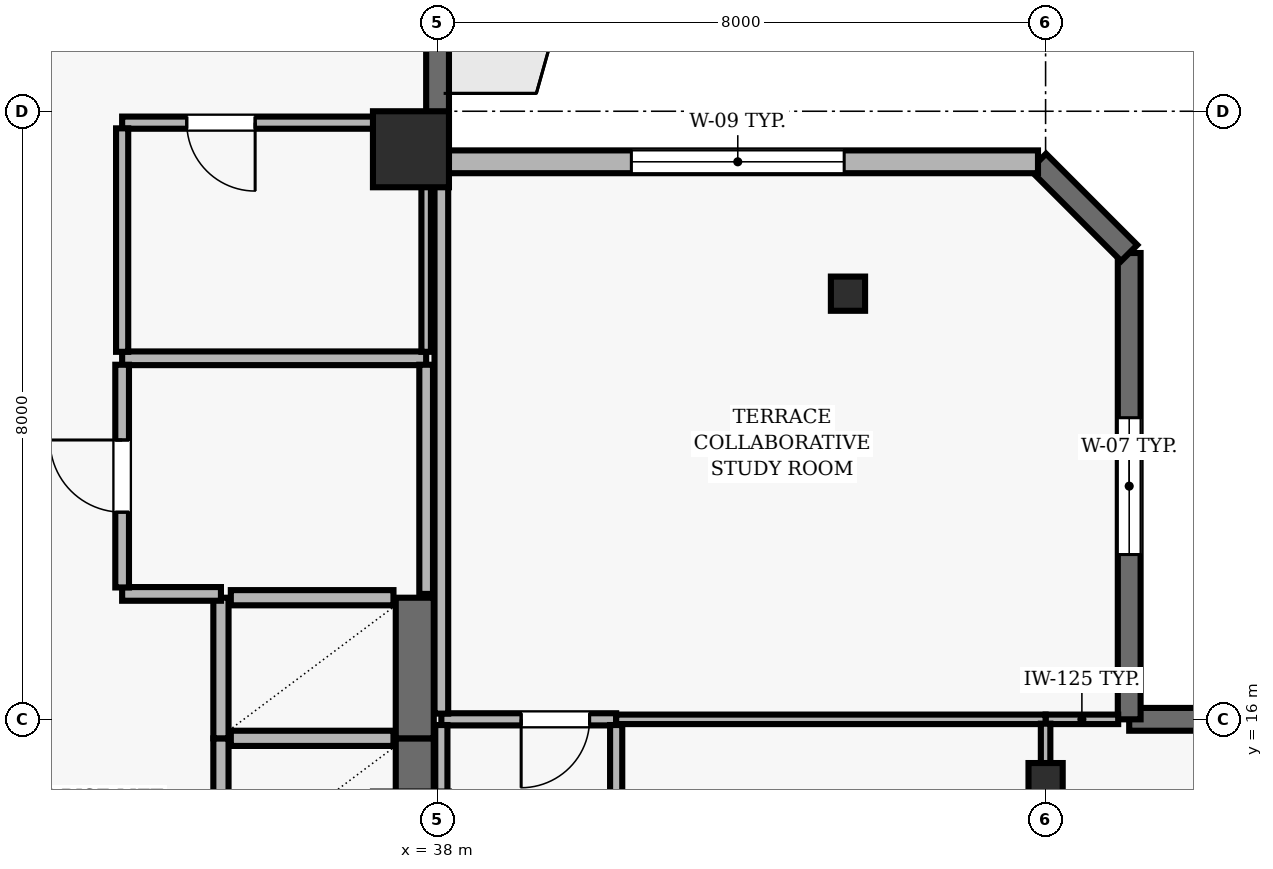
"""IFC4 building model, lengths in metres.
Left out: names, types, materials, properties, quantities, classifications, styles, units other than length and angle.
Written with IfcOpenShell. Run it as: python <this file> out.ifc"""

import sys

from ifc_helpers import new_model, si_unit, direction, frame, frame_2d, origin, origin_2d, place, context, subcontext, project, spatial, rectangle, hollow_rectangle, extrude, element, fill, save


model = new_model("IFC4")
c1 = context("Model", 3, precision=1e-05, world=origin(), true_north=direction((0.0, 1.0)))
c2 = subcontext(c1, "Body", "Model", "MODEL_VIEW")
j1 = project(units=[si_unit("LENGTHUNIT", "METRE"), si_unit("PLANEANGLEUNIT", "RADIAN")], contexts=[c1])
p1 = place(None, origin())
s1 = spatial("IfcSite", under=j1, at=p1, CompositionType="ELEMENT")
p2 = place(p1, origin())
s2 = spatial("IfcBuilding", under=s1, at=p2, CompositionType="ELEMENT")
p3 = place(p2, frame((0.0, 0.0, 203.1)))
s3 = spatial("IfcBuildingStorey", under=s2, at=p3, CompositionType="ELEMENT", Elevation=203.1)
p4 = place(p3, frame((37.65, 23.5, 0.0), z_axis=(0.0, 0.0, 1.0), x_axis=(1.0, 0.0, 0.0)))
e1 = element("IfcColumn", 1, at=p4, inside=s3, PredefinedType="COLUMN", context=c2, shape_type="SweptSolid", body=[
    extrude(rectangle(XDim=1.0, YDim=1.0, at=origin_2d()), origin(), (0.0, 0.0, 1.0), 3.9),
])
for number, where, z_axis, x_axis in (
    (2, (46.0, 15.2, 0.0), (0.0, 0.0, 1.0), (1.0, 0.0, 0.0)),
    (3, (43.4, 21.6, 0.0), (0.0, 0.0, 1.0), (1.0, 0.0, 0.0)),
):
    element("IfcColumn", number, at=place(p3, frame(where, z_axis=z_axis, x_axis=x_axis)), inside=s3, PredefinedType="COLUMN", context=c2, shape_type="SweptSolid", body=[
        extrude(hollow_rectangle(XDim=0.45, YDim=0.45, WallThickness=0.02, at=origin_2d()), origin(), (0.0, 0.0, 1.0), 3.9),
    ])
p5 = place(p3, frame((62.7, 16.0, 0.0), z_axis=(0.0, 0.0, 1.0), x_axis=(-1.0, 0.0, 0.0)))
e4 = element("IfcWall", 4, at=p5, inside=s3, PredefinedType="SOLIDWALL", context=c2, shape_type="SweptSolid", body=[
    extrude(rectangle(XDim=15.6, YDim=0.3, at=frame_2d((7.8, 0.0))), origin(), (0.0, 0.0, 1.0), 3.69),
])
p6 = place(p5, frame((7.2, 0.0, 0.0)))
e5 = element("IfcOpeningElement", 5, at=p6, cuts=e4, PredefinedType="OPENING", context=c2, shape_type="SweptSolid", body=[
    extrude(rectangle(XDim=1.0, YDim=2.2, at=frame_2d((0.5, 1.1))), frame((0.0, 0.16, 0.0), z_axis=(0.0, -1.0, 0.0), x_axis=(1.0, 0.0, 0.0)), (0.0, 0.0, 1.0), 0.32),
])
p7 = place(p5, frame((4.05, 0.0, 0.9)))
e6 = element("IfcOpeningElement", 6, at=p7, cuts=e4, PredefinedType="OPENING", context=c2, shape_type="SweptSolid", body=[
    extrude(rectangle(XDim=1.5, YDim=1.8, at=frame_2d((0.75, 0.9))), frame((0.0, 0.16, 0.0), z_axis=(0.0, -1.0, 0.0), x_axis=(1.0, 0.0, 0.0)), (0.0, 0.0, 1.0), 0.32),
])
p8 = place(p5, frame((10.95, 0.0, 0.9)))
e7 = element("IfcOpeningElement", 7, at=p8, cuts=e4, PredefinedType="OPENING", context=c2, shape_type="SweptSolid", body=[
    extrude(rectangle(XDim=1.5, YDim=1.8, at=frame_2d((0.75, 0.9))), frame((0.0, 0.16, 0.0), z_axis=(0.0, -1.0, 0.0), x_axis=(1.0, 0.0, 0.0)), (0.0, 0.0, 1.0), 0.32),
])
p9 = place(p3, frame((47.1, 16.0, 0.0), z_axis=(0.0, 0.0, 1.0), x_axis=(0.0, 1.0, 0.0)))
e8 = element("IfcWall", 8, at=p9, inside=s3, PredefinedType="SOLIDWALL", context=c2, shape_type="SweptSolid", body=[
    extrude(rectangle(XDim=6.135, YDim=0.3, at=frame_2d((3.067, 0.0))), origin(), (0.0, 0.0, 1.0), 3.69),
])
p10 = place(p9, frame((2.168, 0.0, 0.9)))
e9 = element("IfcOpeningElement", 9, at=p10, cuts=e8, PredefinedType="OPENING", context=c2, shape_type="SweptSolid", body=[
    extrude(rectangle(XDim=1.8, YDim=1.8, at=frame_2d((0.9, 0.9))), frame((0.0, 0.16, 0.0), z_axis=(0.0, -1.0, 0.0), x_axis=(1.0, 0.0, 0.0)), (0.0, 0.0, 1.0), 0.32),
])
p11 = place(p3, frame((47.1, 22.135, 0.0), z_axis=(0.0, 0.0, 1.0), x_axis=(-0.707178703759, 0.707034851297, 0.0)))
e10 = element("IfcWall", 10, at=p11, inside=s3, PredefinedType="SOLIDWALL", context=c2, shape_type="SweptSolid", body=[
    extrude(rectangle(XDim=1.697, YDim=0.3, at=frame_2d((0.849, 0.0))), origin(), (0.0, 0.0, 1.0), 3.69),
])
p12 = place(p3, frame((45.9, 23.335, 0.0), z_axis=(0.0, 0.0, 1.0), x_axis=(-1.0, 0.0, 0.0)))
e11 = element("IfcWall", 11, at=p12, inside=s3, PredefinedType="SOLIDWALL", context=c2, shape_type="SweptSolid", body=[
    extrude(rectangle(XDim=7.9, YDim=0.3, at=frame_2d((3.95, 0.0))), origin(), (0.0, 0.0, 1.0), 3.69),
])
p13 = place(p12, frame((2.55, 0.0, 0.9)))
e12 = element("IfcOpeningElement", 12, at=p13, cuts=e11, PredefinedType="OPENING", context=c2, shape_type="SweptSolid", body=[
    extrude(rectangle(XDim=2.8, YDim=1.8, at=frame_2d((1.4, 0.9))), frame((0.0, 0.16, 0.0), z_axis=(0.0, -1.0, 0.0), x_axis=(1.0, 0.0, 0.0)), (0.0, 0.0, 1.0), 0.32),
])
p14 = place(p3, frame((38.0, 23.335, 0.0), z_axis=(0.0, 0.0, 1.0), x_axis=(0.0, 1.0, 0.0)))
e13 = element("IfcWall", 13, at=p14, inside=s3, PredefinedType="SOLIDWALL", context=c2, shape_type="SweptSolid", body=[
    extrude(rectangle(XDim=17.365, YDim=0.3, at=frame_2d((8.683, 0.0))), origin(), (0.0, 0.0, 1.0), 3.69),
])
p15 = place(p14, frame((8.282, 0.0, 0.0)))
e14 = element("IfcOpeningElement", 14, at=p15, cuts=e13, PredefinedType="OPENING", context=c2, shape_type="SweptSolid", body=[
    extrude(rectangle(XDim=1.0, YDim=2.2, at=frame_2d((0.5, 1.1))), frame((0.0, 0.16, 0.0), z_axis=(0.0, -1.0, 0.0), x_axis=(1.0, 0.0, 0.0)), (0.0, 0.0, 1.0), 0.32),
])
p16 = place(p14, frame((13.571, 0.0, 0.9)))
e15 = element("IfcOpeningElement", 15, at=p16, cuts=e13, PredefinedType="OPENING", context=c2, shape_type="SweptSolid", body=[
    extrude(rectangle(XDim=1.8, YDim=2.2, at=frame_2d((0.9, 1.1))), frame((0.0, 0.16, 0.0), z_axis=(0.0, -1.0, 0.0), x_axis=(1.0, 0.0, 0.0)), (0.0, 0.0, 1.0), 0.32),
])
p17 = place(p3, frame((35.15, 15.75, 0.0), z_axis=(0.0, 0.0, 1.0), x_axis=(0.0, -1.0, 0.0)))
e16 = element("IfcWall", 16, at=p17, inside=s3, PredefinedType="SOLIDWALL", context=c2, shape_type="SweptSolid", body=[
    extrude(rectangle(XDim=1.85, YDim=0.2, at=frame_2d((0.925, 0.0))), origin(), (0.0, 0.0, 1.0), 3.69),
])
p18 = place(p3, frame((37.7, 13.9, 0.0), z_axis=(0.0, 0.0, 1.0), x_axis=(0.0, 1.0, 0.0)))
e17 = element("IfcWall", 17, at=p18, inside=s3, PredefinedType="SHEAR", context=c2, shape_type="SweptSolid", body=[
    extrude(rectangle(XDim=1.85, YDim=0.5, at=frame_2d((0.925, 0.0))), origin(), (0.0, 0.0, 1.0), 3.69),
])
p19 = place(p3, frame((37.42, 15.75, 0.0), z_axis=(0.0, 0.0, 1.0), x_axis=(-1.0, 0.0, 0.0)))
e18 = element("IfcWall", 18, at=p19, inside=s3, PredefinedType="SOLIDWALL", context=c2, shape_type="SweptSolid", body=[
    extrude(rectangle(XDim=2.14, YDim=0.2, at=frame_2d((1.07, 0.0))), origin(), (0.0, 0.0, 1.0), 3.69),
])
p20 = place(p3, frame((35.15, 17.6, 0.0), z_axis=(0.0, 0.0, 1.0), x_axis=(0.0, -1.0, 0.0)))
e19 = element("IfcWall", 19, at=p20, inside=s3, PredefinedType="SOLIDWALL", context=c2, shape_type="SweptSolid", body=[
    extrude(rectangle(XDim=1.85, YDim=0.2, at=frame_2d((0.925, 0.0))), origin(), (0.0, 0.0, 1.0), 3.69),
])
p21 = place(p3, frame((37.7, 15.75, 0.0), z_axis=(0.0, 0.0, 1.0), x_axis=(0.0, 1.0, 0.0)))
e20 = element("IfcWall", 20, at=p21, inside=s3, PredefinedType="SHEAR", context=c2, shape_type="SweptSolid", body=[
    extrude(rectangle(XDim=1.85, YDim=0.5, at=frame_2d((0.925, 0.0))), origin(), (0.0, 0.0, 1.0), 3.69),
])
p22 = place(p3, frame((37.42, 17.6, 0.0), z_axis=(0.0, 0.0, 1.0), x_axis=(-1.0, 0.0, 0.0)))
e21 = element("IfcWall", 21, at=p22, inside=s3, PredefinedType="SOLIDWALL", context=c2, shape_type="SweptSolid", body=[
    extrude(rectangle(XDim=2.14, YDim=0.2, at=frame_2d((1.07, 0.0))), origin(), (0.0, 0.0, 1.0), 3.69),
])
p23 = place(p3, frame((33.85, 17.65, 0.0), z_axis=(0.0, 0.0, 1.0), x_axis=(1.0, 0.0, 0.0)))
e22 = element("IfcWall", 22, at=p23, inside=s3, PredefinedType="PARTITIONING", context=c2, shape_type="SweptSolid", body=[
    extrude(rectangle(XDim=1.3, YDim=0.18, at=frame_2d((0.65, 0.0))), origin(), (0.0, 0.0, 1.0), 3.69),
])
p24 = place(p3, frame((37.85, 20.75, 0.0), z_axis=(0.0, 0.0, 1.0), x_axis=(-1.0, 0.0, 0.0)))
e23 = element("IfcWall", 23, at=p24, inside=s3, PredefinedType="PARTITIONING", context=c2, shape_type="SweptSolid", body=[
    extrude(rectangle(XDim=4.0, YDim=0.18, at=frame_2d((2.0, 0.0))), origin(), (0.0, 0.0, 1.0), 3.69),
])
p25 = place(p3, frame((37.85, 23.85, 0.0), z_axis=(0.0, 0.0, 1.0), x_axis=(-1.0, 0.0, 0.0)))
e24 = element("IfcWall", 24, at=p25, inside=s3, PredefinedType="PARTITIONING", context=c2, shape_type="SweptSolid", body=[
    extrude(rectangle(XDim=4.0, YDim=0.16, at=frame_2d((2.0, 0.0))), origin(), (0.0, 0.0, 1.0), 3.146),
])
p26 = place(p25, frame((2.25, 0.0, 0.0)))
e25 = element("IfcOpeningElement", 25, at=p26, cuts=e24, PredefinedType="OPENING", context=c2, shape_type="SweptSolid", body=[
    extrude(rectangle(XDim=0.9, YDim=2.1, at=frame_2d((0.45, 1.05))), frame((0.0, 0.09, 0.0), z_axis=(0.0, -1.0, 0.0), x_axis=(1.0, 0.0, 0.0)), (0.0, 0.0, 1.0), 0.18),
])
p27 = place(p3, frame((40.35, 16.0, 0.0), z_axis=(0.0, 0.0, 1.0), x_axis=(-1.0, 0.0, 0.0)))
e26 = element("IfcWall", 26, at=p27, inside=s3, PredefinedType="PARTITIONING", context=c2, shape_type="SweptSolid", body=[
    extrude(rectangle(XDim=2.3, YDim=0.16, at=frame_2d((1.15, 0.0))), origin(), (0.0, 0.0, 1.0), 3.39),
])
p28 = place(p27, frame((0.35, 0.0, 0.0)))
e27 = element("IfcOpeningElement", 27, at=p28, cuts=e26, PredefinedType="OPENING", context=c2, shape_type="SweptSolid", body=[
    extrude(rectangle(XDim=0.9, YDim=2.1, at=frame_2d((0.45, 1.05))), frame((0.0, 0.09, 0.0), z_axis=(0.0, -1.0, 0.0), x_axis=(1.0, 0.0, 0.0)), (0.0, 0.0, 1.0), 0.18),
])
p29 = place(p3, frame((46.0, 16.0, 0.0), z_axis=(0.0, 0.0, 1.0), x_axis=(1.0, 0.0, 0.0)))
e28 = element("IfcWall", 28, at=p29, inside=s3, PredefinedType="PARTITIONING", context=c2, shape_type="SweptSolid", body=[
    extrude(rectangle(XDim=0.955, YDim=0.125, at=frame_2d((0.478, 0.0))), origin(), (0.0, 0.0, 1.0), 3.39),
])
p30 = place(p3, frame((46.0, 16.0, 0.0), z_axis=(0.0, 0.0, 1.0), x_axis=(-1.0, 0.0, 0.0)))
e29 = element("IfcWall", 29, at=p30, inside=s3, PredefinedType="PARTITIONING", context=c2, shape_type="SweptSolid", body=[
    extrude(rectangle(XDim=5.65, YDim=0.125, at=frame_2d((2.825, 0.0))), origin(), (0.0, 0.0, 1.0), 3.39),
])
p31 = place(p3, frame((33.85, 17.735, 0.0), z_axis=(0.0, 0.0, 1.0), x_axis=(0.0, 1.0, 0.0)))
e30 = element("IfcWall", 30, at=p31, inside=s3, PredefinedType="PARTITIONING", context=c2, shape_type="SweptSolid", body=[
    extrude(rectangle(XDim=2.93, YDim=0.18, at=frame_2d((1.465, 0.0))), origin(), (0.0, 0.0, 1.0), 3.69),
])
p32 = place(p31, frame((0.99, 0.0, 0.0)))
e31 = element("IfcOpeningElement", 31, at=p32, cuts=e30, PredefinedType="OPENING", context=c2, shape_type="SweptSolid", body=[
    extrude(rectangle(XDim=0.95, YDim=2.1, at=frame_2d((0.475, 1.05))), frame((0.0, 0.1, 0.0), z_axis=(0.0, -1.0, 0.0), x_axis=(1.0, 0.0, 0.0)), (0.0, 0.0, 1.0), 0.2),
])
p33 = place(p3, frame((33.85, 20.835, 0.0), z_axis=(0.0, 0.0, 1.0), x_axis=(0.0, 1.0, 0.0)))
e32 = element("IfcWall", 32, at=p33, inside=s3, PredefinedType="PARTITIONING", context=c2, shape_type="SweptSolid", body=[
    extrude(rectangle(XDim=2.94, YDim=0.16, at=frame_2d((1.47, 0.0))), origin(), (0.0, 0.0, 1.0), 3.69),
])
p34 = place(p3, frame((37.85, 17.65, 0.0), z_axis=(0.0, 0.0, 1.0), x_axis=(0.0, 1.0, 0.0)))
e33 = element("IfcWall", 33, at=p34, inside=s3, PredefinedType="PARTITIONING", context=c2, shape_type="SweptSolid", body=[
    extrude(rectangle(XDim=3.015, YDim=0.18, at=frame_2d((1.508, 0.0))), origin(), (0.0, 0.0, 1.0), 3.146),
])
p35 = place(p3, frame((37.85, 20.835, 0.0), z_axis=(0.0, 0.0, 1.0), x_axis=(0.0, 1.0, 0.0)))
e34 = element("IfcWall", 34, at=p35, inside=s3, PredefinedType="PARTITIONING", context=c2, shape_type="SweptSolid", body=[
    extrude(rectangle(XDim=2.5, YDim=0.125, at=frame_2d((1.25, 0.0))), origin(), (0.0, 0.0, 1.0), 3.146),
])
p36 = place(p3, frame((38.05, 15.925, 0.0), z_axis=(0.0, 0.0, 1.0), x_axis=(0.0, -1.0, 0.0)))
e35 = element("IfcWall", 35, at=p36, inside=s3, PredefinedType="PARTITIONING", context=c2, shape_type="SweptSolid", body=[
    extrude(rectangle(XDim=6.375, YDim=0.16, at=frame_2d((3.188, 0.0))), origin(), (0.0, 0.0, 1.0), 3.146),
])
p37 = place(p3, frame((38.05, 23.19, 0.0), z_axis=(0.0, 0.0, 1.0), x_axis=(0.0, -1.0, 0.0)))
e36 = element("IfcWall", 36, at=p37, inside=s3, PredefinedType="PARTITIONING", context=c2, shape_type="SweptSolid", body=[
    extrude(rectangle(XDim=7.115, YDim=0.18, at=frame_2d((3.558, 0.0))), origin(), (0.0, 0.0, 1.0), 3.146),
])
p38 = place(p3, frame((40.35, 7.625, 0.0), z_axis=(0.0, 0.0, 1.0), x_axis=(0.0, 1.0, 0.0)))
e37 = element("IfcWall", 37, at=p38, inside=s3, PredefinedType="PARTITIONING", context=c2, shape_type="SweptSolid", body=[
    extrude(rectangle(XDim=8.3, YDim=0.16, at=frame_2d((4.15, 0.0))), origin(), (0.0, 0.0, 1.0), 3.372),
])
p39 = place(p38, frame((3.7, 0.0, 0.0)))
e38 = element("IfcOpeningElement", 38, at=p39, cuts=e37, PredefinedType="OPENING", context=c2, shape_type="SweptSolid", body=[
    extrude(rectangle(XDim=0.9, YDim=2.1, at=frame_2d((0.45, 1.05))), frame((0.0, 0.09, 0.0), z_axis=(0.0, -1.0, 0.0), x_axis=(1.0, 0.0, 0.0)), (0.0, 0.0, 1.0), 0.18),
])
p40 = place(p3, frame((46.0, 7.625, 0.0), z_axis=(0.0, 0.0, 1.0), x_axis=(0.0, 1.0, 0.0)))
e39 = element("IfcWall", 39, at=p40, inside=s3, PredefinedType="PARTITIONING", context=c2, shape_type="SweptSolid", body=[
    extrude(rectangle(XDim=8.318, YDim=0.125, at=frame_2d((4.159, 0.0))), origin(), (0.0, 0.0, 1.0), 3.146),
])
p41 = place(p10, origin())
e40 = element("IfcWindow", 40, at=p41, inside=s3, PartitioningType="SINGLE_PANEL", PredefinedType="WINDOW", context=c2, shape_type="SweptSolid", body=[
    extrude(rectangle(XDim=1.8, YDim=1.8, at=frame_2d((0.9, 0.9))), frame((0.0, 0.03, 0.0), z_axis=(0.0, -1.0, 0.0), x_axis=(1.0, 0.0, 0.0)), (0.0, 0.0, 1.0), 0.06),
])
fill(e9, e40)
p42 = place(p13, origin())
e41 = element("IfcWindow", 41, at=p42, inside=s3, PartitioningType="SINGLE_PANEL", PredefinedType="WINDOW", context=c2, shape_type="SweptSolid", body=[
    extrude(rectangle(XDim=2.8, YDim=1.8, at=frame_2d((1.4, 0.9))), frame((0.0, 0.03, 0.0), z_axis=(0.0, -1.0, 0.0), x_axis=(1.0, 0.0, 0.0)), (0.0, 0.0, 1.0), 0.06),
])
fill(e12, e41)
p43 = place(p32, origin())
e42 = element("IfcDoor", 42, at=p43, inside=s3, OperationType="SINGLE_SWING_RIGHT", PredefinedType="DOOR", context=c2, shape_type="SweptSolid", body=[
    extrude(rectangle(XDim=0.95, YDim=2.1, at=frame_2d((0.475, 1.05))), frame((0.0, 0.025, 0.0), z_axis=(0.0, -1.0, 0.0), x_axis=(1.0, 0.0, 0.0)), (0.0, 0.0, 1.0), 0.05),
])
fill(e31, e42)
p44 = place(p26, origin())
e43 = element("IfcDoor", 43, at=p44, inside=s3, OperationType="SINGLE_SWING_LEFT", PredefinedType="DOOR", context=c2, shape_type="SweptSolid", body=[
    extrude(rectangle(XDim=0.9, YDim=2.1, at=frame_2d((0.45, 1.05))), frame((0.0, 0.025, 0.0), z_axis=(0.0, -1.0, 0.0), x_axis=(1.0, 0.0, 0.0)), (0.0, 0.0, 1.0), 0.05),
])
fill(e25, e43)
p45 = place(p28, origin())
e44 = element("IfcDoor", 44, at=p45, inside=s3, OperationType="SINGLE_SWING_RIGHT", PredefinedType="DOOR", context=c2, shape_type="SweptSolid", body=[
    extrude(rectangle(XDim=0.9, YDim=2.1, at=frame_2d((0.45, 1.05))), frame((0.0, 0.025, 0.0), z_axis=(0.0, -1.0, 0.0), x_axis=(1.0, 0.0, 0.0)), (0.0, 0.0, 1.0), 0.05),
])
fill(e27, e44)
save(model, sys.argv[1])
